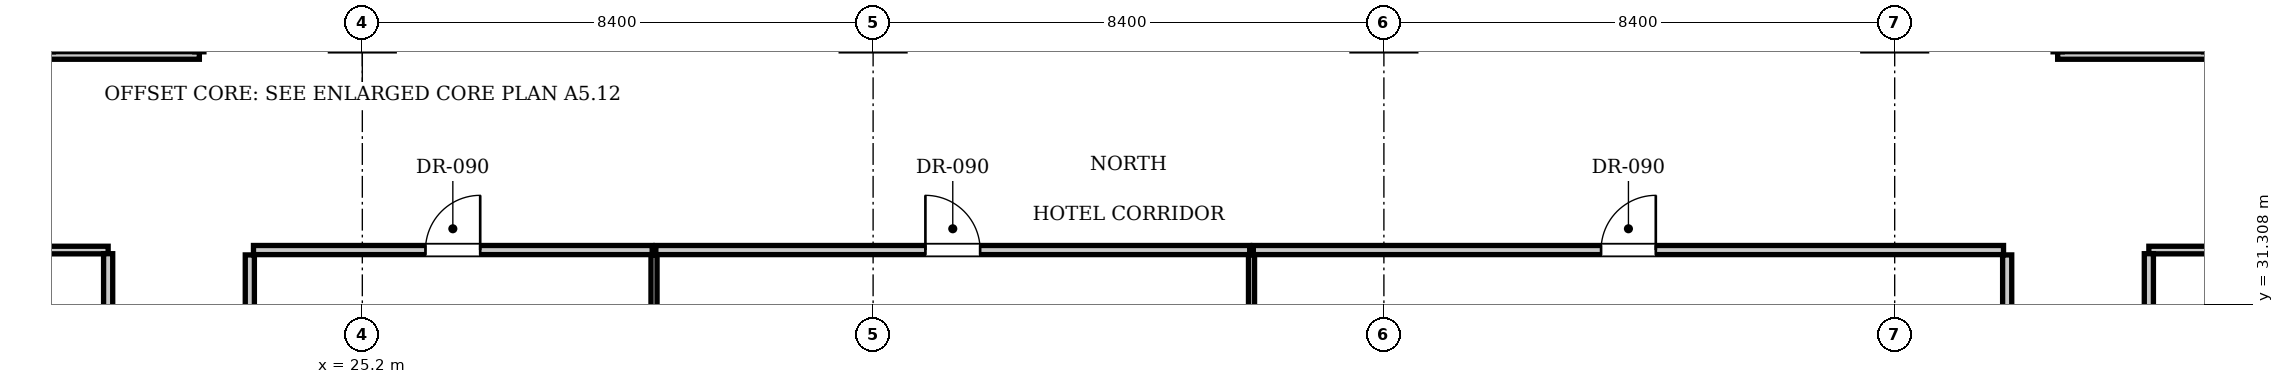
"""IFC4 building model, lengths in metres.
Left out: names, types, materials, properties, quantities, classifications, styles, units other than length and angle.
Written with IfcOpenShell. Run it as: python <this file> out.ifc"""

import sys

from ifc_helpers import new_model, si_unit, direction, frame, frame_2d, origin, place, context, subcontext, project, spatial, rectangle, extrude, element, fill, save


model = new_model("IFC4")
c1 = context("Model", 3, precision=1e-05, world=origin(), true_north=direction((0.0, 1.0)))
c2 = subcontext(c1, "Body", "Model", "MODEL_VIEW")
j1 = project(units=[si_unit("LENGTHUNIT", "METRE"), si_unit("PLANEANGLEUNIT", "RADIAN")], contexts=[c1])
p1 = place(None, origin())
s1 = spatial("IfcSite", under=j1, at=p1, CompositionType="ELEMENT")
p2 = place(p1, origin())
s2 = spatial("IfcBuilding", under=s1, at=p2, CompositionType="ELEMENT")
p3 = place(p2, frame((0.0, 0.0, 42.35)))
s3 = spatial("IfcBuildingStorey", under=s2, at=p3, CompositionType="ELEMENT", Elevation=42.35)
for number, where, z_axis, x_axis in (
    (1, (23.35, 24.58, 0.0), (0.0, 0.0, 1.0), (0.0, 1.0, 0.0)),
    (2, (52.25, 24.58, 0.0), (0.0, 0.0, 1.0), (0.0, 1.0, 0.0)),
):
    element("IfcWall", number, at=place(p3, frame(where, z_axis=z_axis, x_axis=x_axis)), inside=s3, PredefinedType="PARTITIONING", context=c2, shape_type="SweptSolid", body=[
        extrude(rectangle(XDim=7.54, YDim=0.15, at=frame_2d((3.77, 0.0))), origin(), (0.0, 0.0, 1.0), 3.61),
    ])
p4 = place(p3, frame((23.41, 32.2, 0.0), z_axis=(0.0, 0.0, 1.0), x_axis=(1.0, 0.0, 0.0)))
e3 = element("IfcWall", 3, at=p4, inside=s3, PredefinedType="PARTITIONING", context=c2, shape_type="SweptSolid", body=[
    extrude(rectangle(XDim=6.557, YDim=0.15, at=frame_2d((3.279, 0.0))), origin(), (0.0, 0.0, 1.0), 3.61),
])
p5 = place(p4, frame((2.829, 0.0, 0.0)))
e4 = element("IfcOpeningElement", 4, at=p5, cuts=e3, PredefinedType="OPENING", context=c2, shape_type="SweptSolid", body=[
    extrude(rectangle(XDim=0.9, YDim=2.1, at=frame_2d((0.45, 1.05))), frame((0.0, 0.085, 0.0), z_axis=(0.0, -1.0, 0.0), x_axis=(1.0, 0.0, 0.0)), (0.0, 0.0, 1.0), 0.17),
])
p6 = place(p3, frame((29.997, 24.58, 0.0), z_axis=(0.0, 0.0, 1.0), x_axis=(0.0, 1.0, 0.0)))
e5 = element("IfcWall", 5, at=p6, inside=s3, PredefinedType="PARTITIONING", context=c2, shape_type="SweptSolid", body=[
    extrude(rectangle(XDim=7.54, YDim=0.1, at=frame_2d((3.77, 0.0))), origin(), (0.0, 0.0, 1.0), 3.61),
])
p7 = place(p3, frame((30.027, 32.2, 0.0), z_axis=(0.0, 0.0, 1.0), x_axis=(1.0, 0.0, 0.0)))
e6 = element("IfcWall", 6, at=p7, inside=s3, PredefinedType="PARTITIONING", context=c2, shape_type="SweptSolid", body=[
    extrude(rectangle(XDim=9.766, YDim=0.15, at=frame_2d((4.883, 0.0))), origin(), (0.0, 0.0, 1.0), 3.61),
])
p8 = place(p7, frame((4.433, 0.0, 0.0)))
e7 = element("IfcOpeningElement", 7, at=p8, cuts=e6, PredefinedType="OPENING", context=c2, shape_type="SweptSolid", body=[
    extrude(rectangle(XDim=0.9, YDim=2.1, at=frame_2d((0.45, 1.05))), frame((0.0, 0.085, 0.0), z_axis=(0.0, -1.0, 0.0), x_axis=(1.0, 0.0, 0.0)), (0.0, 0.0, 1.0), 0.17),
])
p9 = place(p3, frame((39.823, 24.58, 0.0), z_axis=(0.0, 0.0, 1.0), x_axis=(0.0, 1.0, 0.0)))
e8 = element("IfcWall", 8, at=p9, inside=s3, PredefinedType="PARTITIONING", context=c2, shape_type="SweptSolid", body=[
    extrude(rectangle(XDim=7.54, YDim=0.1, at=frame_2d((3.77, 0.0))), origin(), (0.0, 0.0, 1.0), 3.61),
])
p10 = place(p3, frame((39.853, 32.2, 0.0), z_axis=(0.0, 0.0, 1.0), x_axis=(1.0, 0.0, 0.0)))
e9 = element("IfcWall", 9, at=p10, inside=s3, PredefinedType="PARTITIONING", context=c2, shape_type="SweptSolid", body=[
    extrude(rectangle(XDim=12.337, YDim=0.15, at=frame_2d((6.168, 0.0))), origin(), (0.0, 0.0, 1.0), 3.61),
])
p11 = place(p10, frame((5.719, 0.0, 0.0)))
e10 = element("IfcOpeningElement", 10, at=p11, cuts=e9, PredefinedType="OPENING", context=c2, shape_type="SweptSolid", body=[
    extrude(rectangle(XDim=0.9, YDim=2.1, at=frame_2d((0.45, 1.05))), frame((0.0, 0.085, 0.0), z_axis=(0.0, -1.0, 0.0), x_axis=(1.0, 0.0, 0.0)), (0.0, 0.0, 1.0), 0.17),
])
p12 = place(p3, frame((10.9, 32.2, 0.0), z_axis=(0.0, 0.0, 1.0), x_axis=(1.0, 0.0, 0.0)))
e11 = element("IfcWall", 11, at=p12, inside=s3, PredefinedType="PARTITIONING", context=c2, shape_type="SweptSolid", body=[
    extrude(rectangle(XDim=10.12, YDim=0.125, at=frame_2d((5.06, 0.0))), origin(), (0.0, 0.0, 1.0), 3.61),
])
p13 = place(p3, frame((54.58, 32.2, 0.0), z_axis=(0.0, 0.0, 1.0), x_axis=(1.0, 0.0, 0.0)))
e12 = element("IfcWall", 12, at=p13, inside=s3, PredefinedType="PARTITIONING", context=c2, shape_type="SweptSolid", body=[
    extrude(rectangle(XDim=10.12, YDim=0.125, at=frame_2d((5.06, 0.0))), origin(), (0.0, 0.0, 1.0), 3.61),
])
p14 = place(p3, frame((21.02, 30.25, 0.0), z_axis=(0.0, 0.0, 1.0), x_axis=(0.0, 1.0, 0.0)))
e13 = element("IfcWall", 13, at=p14, inside=s3, PredefinedType="PARTITIONING", context=c2, shape_type="SweptSolid", body=[
    extrude(rectangle(XDim=1.89, YDim=0.15, at=frame_2d((0.945, 0.0))), origin(), (0.0, 0.0, 1.0), 3.403),
])
p15 = place(p3, frame((54.58, 30.25, 0.0), z_axis=(0.0, 0.0, 1.0), x_axis=(0.0, 1.0, 0.0)))
e14 = element("IfcWall", 14, at=p15, inside=s3, PredefinedType="PARTITIONING", context=c2, shape_type="SweptSolid", body=[
    extrude(rectangle(XDim=1.89, YDim=0.15, at=frame_2d((0.945, 0.0))), origin(), (0.0, 0.0, 1.0), 3.457),
])
p16 = place(p3, frame((10.9, 35.4, 0.0), z_axis=(0.0, 0.0, 1.0), x_axis=(1.0, 0.0, 0.0)))
e15 = element("IfcWall", 15, at=p16, inside=s3, PredefinedType="PARTITIONING", context=c2, shape_type="SweptSolid", body=[
    extrude(rectangle(XDim=11.62, YDim=0.125, at=frame_2d((5.81, 0.0))), origin(), (0.0, 0.0, 1.0), 3.61),
])
p17 = place(p3, frame((53.08, 35.4, 0.0), z_axis=(0.0, 0.0, 1.0), x_axis=(1.0, 0.0, 0.0)))
e16 = element("IfcWall", 16, at=p17, inside=s3, PredefinedType="PARTITIONING", context=c2, shape_type="SweptSolid", body=[
    extrude(rectangle(XDim=11.62, YDim=0.125, at=frame_2d((5.81, 0.0))), origin(), (0.0, 0.0, 1.0), 3.61),
])
p18 = place(p5, origin())
e17 = element("IfcDoor", 17, at=p18, inside=s3, OperationType="SINGLE_SWING_RIGHT", PredefinedType="DOOR", context=c2, shape_type="SweptSolid", body=[
    extrude(rectangle(XDim=0.9, YDim=2.1, at=frame_2d((0.45, 1.05))), frame((0.0, 0.025, 0.0), z_axis=(0.0, -1.0, 0.0), x_axis=(1.0, 0.0, 0.0)), (0.0, 0.0, 1.0), 0.05),
])
fill(e4, e17)
p19 = place(p8, origin())
e18 = element("IfcDoor", 18, at=p19, inside=s3, OperationType="SINGLE_SWING_LEFT", PredefinedType="DOOR", context=c2, shape_type="SweptSolid", body=[
    extrude(rectangle(XDim=0.9, YDim=2.1, at=frame_2d((0.45, 1.05))), frame((0.0, 0.025, 0.0), z_axis=(0.0, -1.0, 0.0), x_axis=(1.0, 0.0, 0.0)), (0.0, 0.0, 1.0), 0.05),
])
fill(e7, e18)
p20 = place(p11, origin())
e19 = element("IfcDoor", 19, at=p20, inside=s3, OperationType="SINGLE_SWING_RIGHT", PredefinedType="DOOR", context=c2, shape_type="SweptSolid", body=[
    extrude(rectangle(XDim=0.9, YDim=2.1, at=frame_2d((0.45, 1.05))), frame((0.0, 0.025, 0.0), z_axis=(0.0, -1.0, 0.0), x_axis=(1.0, 0.0, 0.0)), (0.0, 0.0, 1.0), 0.05),
])
fill(e10, e19)
save(model, sys.argv[1])
